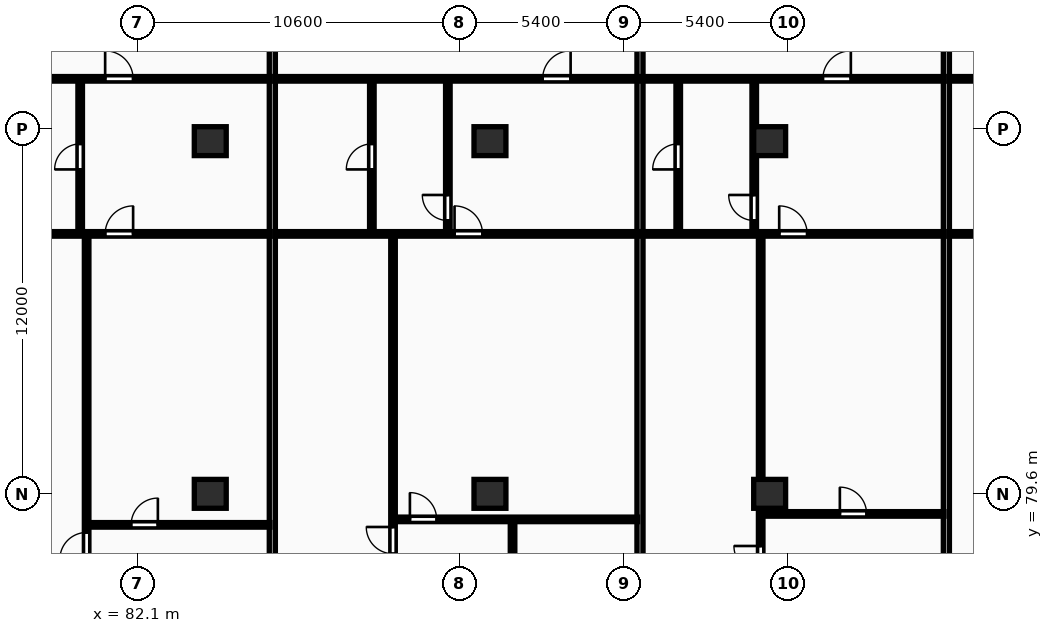
"""IFC4 building model, lengths in metres.
Left out: names, types, materials, properties, quantities, classifications, styles, units other than length and angle.
Written with IfcOpenShell. Run it as: python <this file> out.ifc"""

import sys

from ifc_helpers import new_model, si_unit, direction, frame, frame_2d, origin, origin_2d, place, context, subcontext, project, spatial, rectangle, extrude, element, fill, save


model = new_model("IFC4")
c1 = context("Model", 3, precision=1e-05, world=origin(), true_north=direction((0.0, 1.0)))
c2 = subcontext(c1, "Body", "Model", "MODEL_VIEW")
j1 = project(units=[si_unit("LENGTHUNIT", "METRE"), si_unit("PLANEANGLEUNIT", "RADIAN")], contexts=[c1])
p1 = place(None, origin())
s1 = spatial("IfcSite", under=j1, at=p1, CompositionType="ELEMENT")
p2 = place(p1, origin())
s2 = spatial("IfcBuilding", under=s1, at=p2, CompositionType="ELEMENT")
p3 = place(p2, frame((0.0, 0.0, 24.0)))
s3 = spatial("IfcBuildingStorey", under=s2, at=p3, CompositionType="ELEMENT", Elevation=24.0)
for number, where, z_axis, x_axis in (
    (1, (84.5, 79.6, 0.0), (0.0, 0.0, 1.0), (1.0, 0.0, 0.0)),
    (2, (84.5, 91.2, 0.0), (0.0, 0.0, 1.0), (1.0, 0.0, 0.0)),
    (3, (93.7, 79.6, 0.0), (0.0, 0.0, 1.0), (1.0, 0.0, 0.0)),
    (4, (93.7, 91.2, 0.0), (0.0, 0.0, 1.0), (1.0, 0.0, 0.0)),
    (5, (102.9, 79.6, 0.0), (0.0, 0.0, 1.0), (1.0, 0.0, 0.0)),
    (6, (102.9, 91.2, 0.0), (0.0, 0.0, 1.0), (1.0, 0.0, 0.0)),
):
    element("IfcColumn", number, at=place(p3, frame(where, z_axis=z_axis, x_axis=x_axis)), inside=s3, PredefinedType="COLUMN", context=c2, shape_type="SweptSolid", body=[
        extrude(rectangle(XDim=1.05, YDim=0.95, at=origin_2d()), origin(), (0.0, 0.0, 1.0), 3.25),
    ])
p4 = place(p3, frame((86.542, 69.43, 0.0), z_axis=(0.0, 0.0, 1.0), x_axis=(0.0, 1.0, 0.0)))
e7 = element("IfcWall", 7, at=p4, inside=s3, PredefinedType="PARTITIONING", context=c2, shape_type="SweptSolid", body=[
    extrude(rectangle(XDim=29.07, YDim=0.2, at=frame_2d((14.535, 0.0))), origin(), (0.0, 0.0, 1.0), 2.97),
])
p5 = place(p3, frame((80.494, 78.58, 0.0), z_axis=(0.0, 0.0, 1.0), x_axis=(1.0, 0.0, 0.0)))
e8 = element("IfcWall", 8, at=p5, inside=s3, PredefinedType="PARTITIONING", context=c2, shape_type="SweptSolid", body=[
    extrude(rectangle(XDim=5.968, YDim=0.15, at=frame_2d((2.984, 0.0))), origin(), (0.0, 0.0, 1.0), 2.97),
])
p6 = place(p5, frame((1.403, 0.0, 0.0)))
e9 = element("IfcOpeningElement", 9, at=p6, cuts=e8, PredefinedType="OPENING", context=c2, shape_type="SweptSolid", body=[
    extrude(rectangle(XDim=0.88, YDim=2.06, at=frame_2d((0.44, 1.03))), frame((0.0, 0.085, 0.0), z_axis=(0.0, -1.0, 0.0), x_axis=(1.0, 0.0, 0.0)), (0.0, 0.0, 1.0), 0.17),
])
p7 = place(p3, frame((80.434, 69.41, 0.0), z_axis=(0.0, 0.0, 1.0), x_axis=(0.0, 1.0, 0.0)))
e10 = element("IfcWall", 10, at=p7, inside=s3, PredefinedType="PARTITIONING", context=c2, shape_type="SweptSolid", body=[
    extrude(rectangle(XDim=18.7, YDim=0.15, at=frame_2d((9.35, 0.0))), origin(), (0.0, 0.0, 1.0), 2.97),
])
p8 = place(p7, frame((8.04, 0.0, 0.0)))
e11 = element("IfcOpeningElement", 11, at=p8, cuts=e10, PredefinedType="OPENING", context=c2, shape_type="SweptSolid", body=[
    extrude(rectangle(XDim=0.88, YDim=2.06, at=frame_2d((0.44, 1.03))), frame((0.0, 0.085, 0.0), z_axis=(0.0, -1.0, 0.0), x_axis=(1.0, 0.0, 0.0)), (0.0, 0.0, 1.0), 0.17),
])
p9 = place(p3, frame((80.221, 88.19, 0.0), z_axis=(0.0, 0.0, 1.0), x_axis=(0.0, 1.0, 0.0)))
e12 = element("IfcWall", 12, at=p9, inside=s3, PredefinedType="PARTITIONING", context=c2, shape_type="SweptSolid", body=[
    extrude(rectangle(XDim=5.0, YDim=0.15, at=frame_2d((2.5, 0.0))), origin(), (0.0, 0.0, 1.0), 2.97),
])
p10 = place(p9, frame((2.08, 0.0, 0.0)))
e13 = element("IfcOpeningElement", 13, at=p10, cuts=e12, PredefinedType="OPENING", context=c2, shape_type="SweptSolid", body=[
    extrude(rectangle(XDim=0.84, YDim=2.04, at=frame_2d((0.42, 1.02))), frame((0.0, 0.085, 0.0), z_axis=(0.0, -1.0, 0.0), x_axis=(1.0, 0.0, 0.0)), (0.0, 0.0, 1.0), 0.17),
])
p11 = place(p3, frame((76.544, 88.15, 0.0), z_axis=(0.0, 0.0, 1.0), x_axis=(1.0, 0.0, 0.0)))
e14 = element("IfcWall", 14, at=p11, inside=s3, PredefinedType="PARTITIONING", context=c2, shape_type="SweptSolid", body=[
    extrude(rectangle(XDim=9.918, YDim=0.15, at=frame_2d((4.959, 0.0))), origin(), (0.0, 0.0, 1.0), 2.97),
])
p12 = place(p11, frame((4.499, 0.0, 0.0)))
e15 = element("IfcOpeningElement", 15, at=p12, cuts=e14, PredefinedType="OPENING", context=c2, shape_type="SweptSolid", body=[
    extrude(rectangle(XDim=0.92, YDim=2.08, at=frame_2d((0.46, 1.04))), frame((0.0, 0.085, 0.0), z_axis=(0.0, -1.0, 0.0), x_axis=(1.0, 0.0, 0.0)), (0.0, 0.0, 1.0), 0.17),
])
p13 = place(p3, frame((76.544, 93.25, 0.0), z_axis=(0.0, 0.0, 1.0), x_axis=(1.0, 0.0, 0.0)))
e16 = element("IfcWall", 16, at=p13, inside=s3, PredefinedType="PARTITIONING", context=c2, shape_type="SweptSolid", body=[
    extrude(rectangle(XDim=9.918, YDim=0.15, at=frame_2d((4.959, 0.0))), origin(), (0.0, 0.0, 1.0), 2.97),
])
p14 = place(p13, frame((4.499, 0.0, 0.0)))
e17 = element("IfcOpeningElement", 17, at=p14, cuts=e16, PredefinedType="OPENING", context=c2, shape_type="SweptSolid", body=[
    extrude(rectangle(XDim=0.92, YDim=2.08, at=frame_2d((0.46, 1.04))), frame((0.0, 0.085, 0.0), z_axis=(0.0, -1.0, 0.0), x_axis=(1.0, 0.0, 0.0)), (0.0, 0.0, 1.0), 0.17),
])
p15 = place(p3, frame((98.635, 69.43, 0.0), z_axis=(0.0, 0.0, 1.0), x_axis=(0.0, 1.0, 0.0)))
e18 = element("IfcWall", 18, at=p15, inside=s3, PredefinedType="PARTITIONING", context=c2, shape_type="SweptSolid", body=[
    extrude(rectangle(XDim=29.07, YDim=0.2, at=frame_2d((14.535, 0.0))), origin(), (0.0, 0.0, 1.0), 2.97),
])
p16 = place(p3, frame((94.443, 69.41, 0.0), z_axis=(0.0, 0.0, 1.0), x_axis=(0.0, 1.0, 0.0)))
e19 = element("IfcWall", 19, at=p16, inside=s3, PredefinedType="PARTITIONING", context=c2, shape_type="SweptSolid", body=[
    extrude(rectangle(XDim=9.35, YDim=0.15, at=frame_2d((4.675, 0.0))), origin(), (0.0, 0.0, 1.0), 2.97),
])
p17 = place(p16, frame((4.255, 0.0, 0.0)))
e20 = element("IfcOpeningElement", 20, at=p17, cuts=e19, PredefinedType="OPENING", context=c2, shape_type="SweptSolid", body=[
    extrude(rectangle(XDim=0.84, YDim=2.04, at=frame_2d((0.42, 1.02))), frame((0.0, 0.085, 0.0), z_axis=(0.0, -1.0, 0.0), x_axis=(1.0, 0.0, 0.0)), (0.0, 0.0, 1.0), 0.17),
])
p18 = place(p3, frame((90.572, 78.76, 0.0), z_axis=(0.0, 0.0, 1.0), x_axis=(1.0, 0.0, 0.0)))
e21 = element("IfcWall", 21, at=p18, inside=s3, PredefinedType="PARTITIONING", context=c2, shape_type="SweptSolid", body=[
    extrude(rectangle(XDim=7.983, YDim=0.15, at=frame_2d((3.992, 0.0))), origin(), (0.0, 0.0, 1.0), 2.97),
])
p19 = place(p18, frame((0.495, 0.0, 0.0)))
e22 = element("IfcOpeningElement", 22, at=p19, cuts=e21, PredefinedType="OPENING", context=c2, shape_type="SweptSolid", body=[
    extrude(rectangle(XDim=0.88, YDim=2.06, at=frame_2d((0.44, 1.03))), frame((0.0, 0.085, 0.0), z_axis=(0.0, -1.0, 0.0), x_axis=(1.0, 0.0, 0.0)), (0.0, 0.0, 1.0), 0.17),
])
p20 = place(p3, frame((90.511, 69.41, 0.0), z_axis=(0.0, 0.0, 1.0), x_axis=(0.0, 1.0, 0.0)))
e23 = element("IfcWall", 23, at=p20, inside=s3, PredefinedType="PARTITIONING", context=c2, shape_type="SweptSolid", body=[
    extrude(rectangle(XDim=18.7, YDim=0.15, at=frame_2d((9.35, 0.0))), origin(), (0.0, 0.0, 1.0), 2.97),
])
p21 = place(p20, frame((8.22, 0.0, 0.0)))
e24 = element("IfcOpeningElement", 24, at=p21, cuts=e23, PredefinedType="OPENING", context=c2, shape_type="SweptSolid", body=[
    extrude(rectangle(XDim=0.88, YDim=2.06, at=frame_2d((0.44, 1.03))), frame((0.0, 0.085, 0.0), z_axis=(0.0, -1.0, 0.0), x_axis=(1.0, 0.0, 0.0)), (0.0, 0.0, 1.0), 0.17),
])
p22 = place(p3, frame((89.815, 88.19, 0.0), z_axis=(0.0, 0.0, 1.0), x_axis=(0.0, 1.0, 0.0)))
e25 = element("IfcWall", 25, at=p22, inside=s3, PredefinedType="PARTITIONING", context=c2, shape_type="SweptSolid", body=[
    extrude(rectangle(XDim=5.0, YDim=0.15, at=frame_2d((2.5, 0.0))), origin(), (0.0, 0.0, 1.0), 2.97),
])
p23 = place(p22, frame((2.08, 0.0, 0.0)))
e26 = element("IfcOpeningElement", 26, at=p23, cuts=e25, PredefinedType="OPENING", context=c2, shape_type="SweptSolid", body=[
    extrude(rectangle(XDim=0.84, YDim=2.04, at=frame_2d((0.42, 1.02))), frame((0.0, 0.085, 0.0), z_axis=(0.0, -1.0, 0.0), x_axis=(1.0, 0.0, 0.0)), (0.0, 0.0, 1.0), 0.17),
])
p24 = place(p3, frame((92.315, 88.19, 0.0), z_axis=(0.0, 0.0, 1.0), x_axis=(0.0, 1.0, 0.0)))
e27 = element("IfcWall", 27, at=p24, inside=s3, PredefinedType="PARTITIONING", context=c2, shape_type="SweptSolid", body=[
    extrude(rectangle(XDim=5.0, YDim=0.15, at=frame_2d((2.5, 0.0))), origin(), (0.0, 0.0, 1.0), 2.97),
])
p25 = place(p24, frame((0.4, 0.0, 0.0)))
e28 = element("IfcOpeningElement", 28, at=p25, cuts=e27, PredefinedType="OPENING", context=c2, shape_type="SweptSolid", body=[
    extrude(rectangle(XDim=0.84, YDim=2.04, at=frame_2d((0.42, 1.02))), frame((0.0, 0.085, 0.0), z_axis=(0.0, -1.0, 0.0), x_axis=(1.0, 0.0, 0.0)), (0.0, 0.0, 1.0), 0.17),
])
p26 = place(p3, frame((86.622, 88.15, 0.0), z_axis=(0.0, 0.0, 1.0), x_axis=(1.0, 0.0, 0.0)))
e29 = element("IfcWall", 29, at=p26, inside=s3, PredefinedType="PARTITIONING", context=c2, shape_type="SweptSolid", body=[
    extrude(rectangle(XDim=11.933, YDim=0.15, at=frame_2d((5.967, 0.0))), origin(), (0.0, 0.0, 1.0), 2.97),
])
p27 = place(p26, frame((5.914, 0.0, 0.0)))
e30 = element("IfcOpeningElement", 30, at=p27, cuts=e29, PredefinedType="OPENING", context=c2, shape_type="SweptSolid", body=[
    extrude(rectangle(XDim=0.92, YDim=2.08, at=frame_2d((0.46, 1.04))), frame((0.0, 0.085, 0.0), z_axis=(0.0, -1.0, 0.0), x_axis=(1.0, 0.0, 0.0)), (0.0, 0.0, 1.0), 0.17),
])
p28 = place(p3, frame((86.622, 93.25, 0.0), z_axis=(0.0, 0.0, 1.0), x_axis=(1.0, 0.0, 0.0)))
e31 = element("IfcWall", 31, at=p28, inside=s3, PredefinedType="PARTITIONING", context=c2, shape_type="SweptSolid", body=[
    extrude(rectangle(XDim=11.933, YDim=0.15, at=frame_2d((5.967, 0.0))), origin(), (0.0, 0.0, 1.0), 2.97),
])
p29 = place(p28, frame((8.812, 0.0, 0.0)))
e32 = element("IfcOpeningElement", 32, at=p29, cuts=e31, PredefinedType="OPENING", context=c2, shape_type="SweptSolid", body=[
    extrude(rectangle(XDim=0.92, YDim=2.08, at=frame_2d((0.46, 1.04))), frame((0.0, 0.085, 0.0), z_axis=(0.0, -1.0, 0.0), x_axis=(1.0, 0.0, 0.0)), (0.0, 0.0, 1.0), 0.17),
])
p30 = place(p3, frame((108.713, 69.43, 0.0), z_axis=(0.0, 0.0, 1.0), x_axis=(0.0, 1.0, 0.0)))
e33 = element("IfcWall", 33, at=p30, inside=s3, PredefinedType="PARTITIONING", context=c2, shape_type="SweptSolid", body=[
    extrude(rectangle(XDim=29.07, YDim=0.2, at=frame_2d((14.535, 0.0))), origin(), (0.0, 0.0, 1.0), 2.97),
])
p31 = place(p3, frame((102.665, 78.94, 0.0), z_axis=(0.0, 0.0, 1.0), x_axis=(1.0, 0.0, 0.0)))
e34 = element("IfcWall", 34, at=p31, inside=s3, PredefinedType="PARTITIONING", context=c2, shape_type="SweptSolid", body=[
    extrude(rectangle(XDim=5.968, YDim=0.15, at=frame_2d((2.984, 0.0))), origin(), (0.0, 0.0, 1.0), 2.97),
])
p32 = place(p31, frame((2.544, 0.0, 0.0)))
e35 = element("IfcOpeningElement", 35, at=p32, cuts=e34, PredefinedType="OPENING", context=c2, shape_type="SweptSolid", body=[
    extrude(rectangle(XDim=0.88, YDim=2.06, at=frame_2d((0.44, 1.03))), frame((0.0, 0.085, 0.0), z_axis=(0.0, -1.0, 0.0), x_axis=(1.0, 0.0, 0.0)), (0.0, 0.0, 1.0), 0.17),
])
p33 = place(p3, frame((102.605, 69.41, 0.0), z_axis=(0.0, 0.0, 1.0), x_axis=(0.0, 1.0, 0.0)))
e36 = element("IfcWall", 36, at=p33, inside=s3, PredefinedType="PARTITIONING", context=c2, shape_type="SweptSolid", body=[
    extrude(rectangle(XDim=18.7, YDim=0.15, at=frame_2d((9.35, 0.0))), origin(), (0.0, 0.0, 1.0), 2.22),
])
p34 = place(p33, frame((7.595, 0.0, 0.0)))
e37 = element("IfcOpeningElement", 37, at=p34, cuts=e36, PredefinedType="OPENING", context=c2, shape_type="SweptSolid", body=[
    extrude(rectangle(XDim=0.88, YDim=2.06, at=frame_2d((0.44, 1.03))), frame((0.0, 0.085, 0.0), z_axis=(0.0, -1.0, 0.0), x_axis=(1.0, 0.0, 0.0)), (0.0, 0.0, 1.0), 0.17),
])
p35 = place(p3, frame((99.893, 88.19, 0.0), z_axis=(0.0, 0.0, 1.0), x_axis=(0.0, 1.0, 0.0)))
e38 = element("IfcWall", 38, at=p35, inside=s3, PredefinedType="PARTITIONING", context=c2, shape_type="SweptSolid", body=[
    extrude(rectangle(XDim=5.0, YDim=0.15, at=frame_2d((2.5, 0.0))), origin(), (0.0, 0.0, 1.0), 2.97),
])
p36 = place(p35, frame((2.08, 0.0, 0.0)))
e39 = element("IfcOpeningElement", 39, at=p36, cuts=e38, PredefinedType="OPENING", context=c2, shape_type="SweptSolid", body=[
    extrude(rectangle(XDim=0.84, YDim=2.04, at=frame_2d((0.42, 1.02))), frame((0.0, 0.085, 0.0), z_axis=(0.0, -1.0, 0.0), x_axis=(1.0, 0.0, 0.0)), (0.0, 0.0, 1.0), 0.17),
])
p37 = place(p3, frame((102.393, 88.19, 0.0), z_axis=(0.0, 0.0, 1.0), x_axis=(0.0, 1.0, 0.0)))
e40 = element("IfcWall", 40, at=p37, inside=s3, PredefinedType="PARTITIONING", context=c2, shape_type="SweptSolid", body=[
    extrude(rectangle(XDim=5.0, YDim=0.15, at=frame_2d((2.5, 0.0))), origin(), (0.0, 0.0, 1.0), 2.97),
])
p38 = place(p37, frame((0.4, 0.0, 0.0)))
e41 = element("IfcOpeningElement", 41, at=p38, cuts=e40, PredefinedType="OPENING", context=c2, shape_type="SweptSolid", body=[
    extrude(rectangle(XDim=0.84, YDim=2.04, at=frame_2d((0.42, 1.02))), frame((0.0, 0.085, 0.0), z_axis=(0.0, -1.0, 0.0), x_axis=(1.0, 0.0, 0.0)), (0.0, 0.0, 1.0), 0.17),
])
p39 = place(p3, frame((98.715, 88.15, 0.0), z_axis=(0.0, 0.0, 1.0), x_axis=(1.0, 0.0, 0.0)))
e42 = element("IfcWall", 42, at=p39, inside=s3, PredefinedType="PARTITIONING", context=c2, shape_type="SweptSolid", body=[
    extrude(rectangle(XDim=9.918, YDim=0.15, at=frame_2d((4.959, 0.0))), origin(), (0.0, 0.0, 1.0), 2.97),
])
p40 = place(p39, frame((4.499, 0.0, 0.0)))
e43 = element("IfcOpeningElement", 43, at=p40, cuts=e42, PredefinedType="OPENING", context=c2, shape_type="SweptSolid", body=[
    extrude(rectangle(XDim=0.92, YDim=2.08, at=frame_2d((0.46, 1.04))), frame((0.0, 0.085, 0.0), z_axis=(0.0, -1.0, 0.0), x_axis=(1.0, 0.0, 0.0)), (0.0, 0.0, 1.0), 0.17),
])
p41 = place(p3, frame((98.715, 93.25, 0.0), z_axis=(0.0, 0.0, 1.0), x_axis=(1.0, 0.0, 0.0)))
e44 = element("IfcWall", 44, at=p41, inside=s3, PredefinedType="PARTITIONING", context=c2, shape_type="SweptSolid", body=[
    extrude(rectangle(XDim=9.918, YDim=0.15, at=frame_2d((4.959, 0.0))), origin(), (0.0, 0.0, 1.0), 2.97),
])
p42 = place(p41, frame((5.936, 0.0, 0.0)))
e45 = element("IfcOpeningElement", 45, at=p42, cuts=e44, PredefinedType="OPENING", context=c2, shape_type="SweptSolid", body=[
    extrude(rectangle(XDim=0.92, YDim=2.08, at=frame_2d((0.46, 1.04))), frame((0.0, 0.085, 0.0), z_axis=(0.0, -1.0, 0.0), x_axis=(1.0, 0.0, 0.0)), (0.0, 0.0, 1.0), 0.17),
])
p43 = place(p3, frame((108.793, 88.15, 0.0), z_axis=(0.0, 0.0, 1.0), x_axis=(1.0, 0.0, 0.0)))
e46 = element("IfcWall", 46, at=p43, inside=s3, PredefinedType="PARTITIONING", context=c2, shape_type="SweptSolid", body=[
    extrude(rectangle(XDim=10.926, YDim=0.15, at=frame_2d((5.463, 0.0))), origin(), (0.0, 0.0, 1.0), 2.97),
])
p44 = place(p43, frame((5.003, 0.0, 0.0)))
e47 = element("IfcOpeningElement", 47, at=p44, cuts=e46, PredefinedType="OPENING", context=c2, shape_type="SweptSolid", body=[
    extrude(rectangle(XDim=0.92, YDim=2.08, at=frame_2d((0.46, 1.04))), frame((0.0, 0.085, 0.0), z_axis=(0.0, -1.0, 0.0), x_axis=(1.0, 0.0, 0.0)), (0.0, 0.0, 1.0), 0.17),
])
p45 = place(p3, frame((108.793, 93.25, 0.0), z_axis=(0.0, 0.0, 1.0), x_axis=(1.0, 0.0, 0.0)))
e48 = element("IfcWall", 48, at=p45, inside=s3, PredefinedType="PARTITIONING", context=c2, shape_type="SweptSolid", body=[
    extrude(rectangle(XDim=10.926, YDim=0.15, at=frame_2d((5.463, 0.0))), origin(), (0.0, 0.0, 1.0), 2.97),
])
p46 = place(p45, frame((5.031, 0.0, 0.0)))
e49 = element("IfcOpeningElement", 49, at=p46, cuts=e48, PredefinedType="OPENING", context=c2, shape_type="SweptSolid", body=[
    extrude(rectangle(XDim=0.92, YDim=2.08, at=frame_2d((0.46, 1.04))), frame((0.0, 0.085, 0.0), z_axis=(0.0, -1.0, 0.0), x_axis=(1.0, 0.0, 0.0)), (0.0, 0.0, 1.0), 0.17),
])
p47 = place(p6, origin())
e50 = element("IfcDoor", 50, at=p47, inside=s3, OperationType="SINGLE_SWING_RIGHT", PredefinedType="DOOR", context=c2, shape_type="SweptSolid", body=[
    extrude(rectangle(XDim=0.88, YDim=2.06, at=frame_2d((0.44, 1.03))), frame((0.0, 0.025, 0.0), z_axis=(0.0, -1.0, 0.0), x_axis=(1.0, 0.0, 0.0)), (0.0, 0.0, 1.0), 0.05),
])
fill(e9, e50)
p48 = place(p8, origin())
e51 = element("IfcDoor", 51, at=p48, inside=s3, OperationType="SINGLE_SWING_LEFT", PredefinedType="DOOR", context=c2, shape_type="SweptSolid", body=[
    extrude(rectangle(XDim=0.88, YDim=2.06, at=frame_2d((0.44, 1.03))), frame((0.0, 0.025, 0.0), z_axis=(0.0, -1.0, 0.0), x_axis=(1.0, 0.0, 0.0)), (0.0, 0.0, 1.0), 0.05),
])
fill(e11, e51)
p49 = place(p10, origin())
e52 = element("IfcDoor", 52, at=p49, inside=s3, OperationType="SINGLE_SWING_LEFT", PredefinedType="DOOR", context=c2, shape_type="SweptSolid", body=[
    extrude(rectangle(XDim=0.84, YDim=2.04, at=frame_2d((0.42, 1.02))), frame((0.0, 0.025, 0.0), z_axis=(0.0, -1.0, 0.0), x_axis=(1.0, 0.0, 0.0)), (0.0, 0.0, 1.0), 0.05),
])
fill(e13, e52)
p50 = place(p12, origin())
e53 = element("IfcDoor", 53, at=p50, inside=s3, OperationType="SINGLE_SWING_RIGHT", PredefinedType="DOOR", context=c2, shape_type="SweptSolid", body=[
    extrude(rectangle(XDim=0.92, YDim=2.08, at=frame_2d((0.46, 1.04))), frame((0.0, 0.025, 0.0), z_axis=(0.0, -1.0, 0.0), x_axis=(1.0, 0.0, 0.0)), (0.0, 0.0, 1.0), 0.05),
])
fill(e15, e53)
p51 = place(p14, origin())
e54 = element("IfcDoor", 54, at=p51, inside=s3, OperationType="SINGLE_SWING_LEFT", PredefinedType="DOOR", context=c2, shape_type="SweptSolid", body=[
    extrude(rectangle(XDim=0.92, YDim=2.08, at=frame_2d((0.46, 1.04))), frame((0.0, 0.025, 0.0), z_axis=(0.0, -1.0, 0.0), x_axis=(1.0, 0.0, 0.0)), (0.0, 0.0, 1.0), 0.05),
])
fill(e17, e54)
p52 = place(p19, origin())
e55 = element("IfcDoor", 55, at=p52, inside=s3, OperationType="SINGLE_SWING_LEFT", PredefinedType="DOOR", context=c2, shape_type="SweptSolid", body=[
    extrude(rectangle(XDim=0.88, YDim=2.06, at=frame_2d((0.44, 1.03))), frame((0.0, 0.025, 0.0), z_axis=(0.0, -1.0, 0.0), x_axis=(1.0, 0.0, 0.0)), (0.0, 0.0, 1.0), 0.05),
])
fill(e22, e55)
p53 = place(p21, origin())
e56 = element("IfcDoor", 56, at=p53, inside=s3, OperationType="SINGLE_SWING_RIGHT", PredefinedType="DOOR", context=c2, shape_type="SweptSolid", body=[
    extrude(rectangle(XDim=0.88, YDim=2.06, at=frame_2d((0.44, 1.03))), frame((0.0, 0.025, 0.0), z_axis=(0.0, -1.0, 0.0), x_axis=(1.0, 0.0, 0.0)), (0.0, 0.0, 1.0), 0.05),
])
fill(e24, e56)
p54 = place(p23, origin())
e57 = element("IfcDoor", 57, at=p54, inside=s3, OperationType="SINGLE_SWING_LEFT", PredefinedType="DOOR", context=c2, shape_type="SweptSolid", body=[
    extrude(rectangle(XDim=0.84, YDim=2.04, at=frame_2d((0.42, 1.02))), frame((0.0, 0.025, 0.0), z_axis=(0.0, -1.0, 0.0), x_axis=(1.0, 0.0, 0.0)), (0.0, 0.0, 1.0), 0.05),
])
fill(e26, e57)
p55 = place(p25, origin())
e58 = element("IfcDoor", 58, at=p55, inside=s3, OperationType="SINGLE_SWING_RIGHT", PredefinedType="DOOR", context=c2, shape_type="SweptSolid", body=[
    extrude(rectangle(XDim=0.84, YDim=2.04, at=frame_2d((0.42, 1.02))), frame((0.0, 0.025, 0.0), z_axis=(0.0, -1.0, 0.0), x_axis=(1.0, 0.0, 0.0)), (0.0, 0.0, 1.0), 0.05),
])
fill(e28, e58)
p56 = place(p27, origin())
e59 = element("IfcDoor", 59, at=p56, inside=s3, OperationType="SINGLE_SWING_LEFT", PredefinedType="DOOR", context=c2, shape_type="SweptSolid", body=[
    extrude(rectangle(XDim=0.92, YDim=2.08, at=frame_2d((0.46, 1.04))), frame((0.0, 0.025, 0.0), z_axis=(0.0, -1.0, 0.0), x_axis=(1.0, 0.0, 0.0)), (0.0, 0.0, 1.0), 0.05),
])
fill(e30, e59)
p57 = place(p29, origin())
e60 = element("IfcDoor", 60, at=p57, inside=s3, OperationType="SINGLE_SWING_RIGHT", PredefinedType="DOOR", context=c2, shape_type="SweptSolid", body=[
    extrude(rectangle(XDim=0.92, YDim=2.08, at=frame_2d((0.46, 1.04))), frame((0.0, 0.025, 0.0), z_axis=(0.0, -1.0, 0.0), x_axis=(1.0, 0.0, 0.0)), (0.0, 0.0, 1.0), 0.05),
])
fill(e32, e60)
p58 = place(p32, origin())
e61 = element("IfcDoor", 61, at=p58, inside=s3, OperationType="SINGLE_SWING_LEFT", PredefinedType="DOOR", context=c2, shape_type="SweptSolid", body=[
    extrude(rectangle(XDim=0.88, YDim=2.06, at=frame_2d((0.44, 1.03))), frame((0.0, 0.025, 0.0), z_axis=(0.0, -1.0, 0.0), x_axis=(1.0, 0.0, 0.0)), (0.0, 0.0, 1.0), 0.05),
])
fill(e35, e61)
p59 = place(p34, origin())
e62 = element("IfcDoor", 62, at=p59, inside=s3, OperationType="SINGLE_SWING_RIGHT", PredefinedType="DOOR", context=c2, shape_type="SweptSolid", body=[
    extrude(rectangle(XDim=0.88, YDim=2.06, at=frame_2d((0.44, 1.03))), frame((0.0, 0.025, 0.0), z_axis=(0.0, -1.0, 0.0), x_axis=(1.0, 0.0, 0.0)), (0.0, 0.0, 1.0), 0.05),
])
fill(e37, e62)
p60 = place(p36, origin())
e63 = element("IfcDoor", 63, at=p60, inside=s3, OperationType="SINGLE_SWING_LEFT", PredefinedType="DOOR", context=c2, shape_type="SweptSolid", body=[
    extrude(rectangle(XDim=0.84, YDim=2.04, at=frame_2d((0.42, 1.02))), frame((0.0, 0.025, 0.0), z_axis=(0.0, -1.0, 0.0), x_axis=(1.0, 0.0, 0.0)), (0.0, 0.0, 1.0), 0.05),
])
fill(e39, e63)
p61 = place(p38, origin())
e64 = element("IfcDoor", 64, at=p61, inside=s3, OperationType="SINGLE_SWING_RIGHT", PredefinedType="DOOR", context=c2, shape_type="SweptSolid", body=[
    extrude(rectangle(XDim=0.84, YDim=2.04, at=frame_2d((0.42, 1.02))), frame((0.0, 0.025, 0.0), z_axis=(0.0, -1.0, 0.0), x_axis=(1.0, 0.0, 0.0)), (0.0, 0.0, 1.0), 0.05),
])
fill(e41, e64)
p62 = place(p40, origin())
e65 = element("IfcDoor", 65, at=p62, inside=s3, OperationType="SINGLE_SWING_LEFT", PredefinedType="DOOR", context=c2, shape_type="SweptSolid", body=[
    extrude(rectangle(XDim=0.92, YDim=2.08, at=frame_2d((0.46, 1.04))), frame((0.0, 0.025, 0.0), z_axis=(0.0, -1.0, 0.0), x_axis=(1.0, 0.0, 0.0)), (0.0, 0.0, 1.0), 0.05),
])
fill(e43, e65)
p63 = place(p42, origin())
e66 = element("IfcDoor", 66, at=p63, inside=s3, OperationType="SINGLE_SWING_RIGHT", PredefinedType="DOOR", context=c2, shape_type="SweptSolid", body=[
    extrude(rectangle(XDim=0.92, YDim=2.08, at=frame_2d((0.46, 1.04))), frame((0.0, 0.025, 0.0), z_axis=(0.0, -1.0, 0.0), x_axis=(1.0, 0.0, 0.0)), (0.0, 0.0, 1.0), 0.05),
])
fill(e45, e66)
save(model, sys.argv[1])
